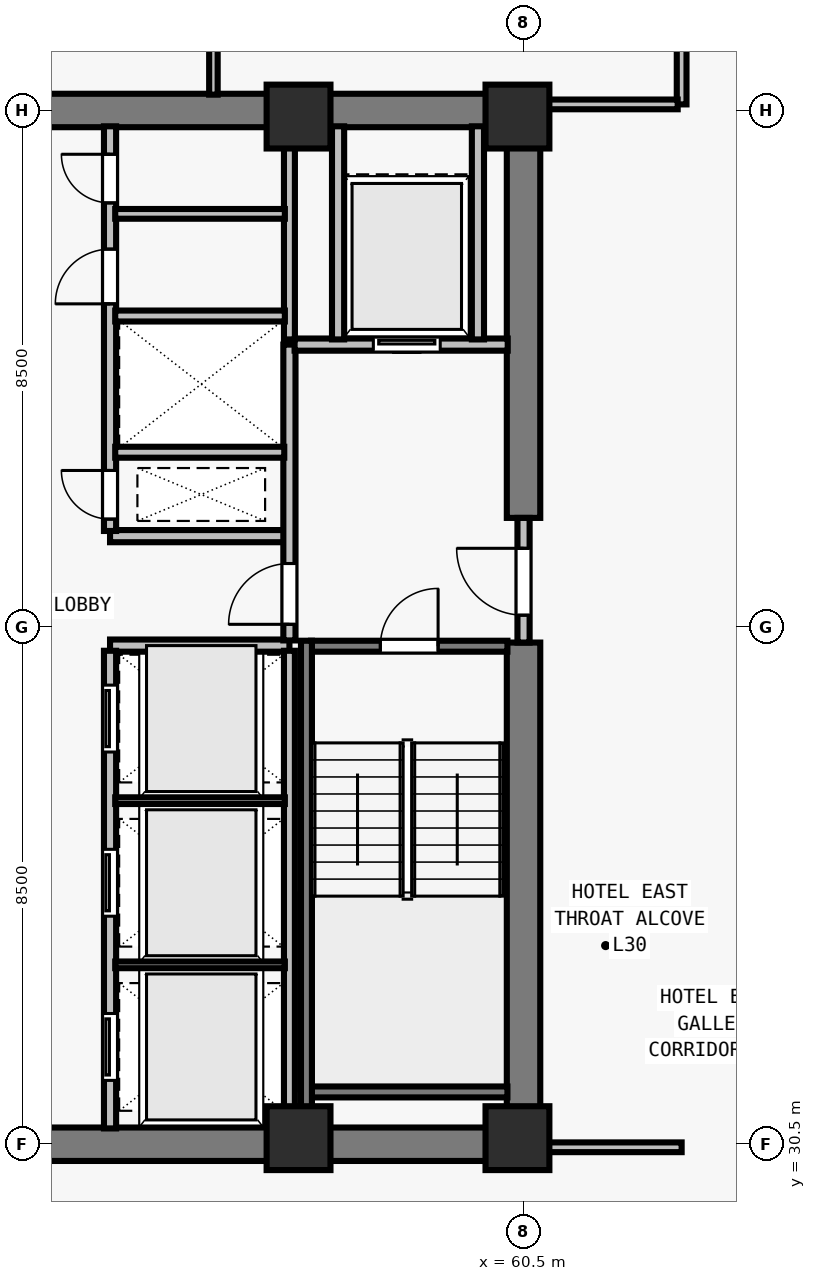
"""IFC4 building model, lengths in metres.
Left out: names, types, materials, properties, quantities, classifications, styles, units other than length and angle.
Written with IfcOpenShell. Run it as: python <this file> out.ifc"""

import sys

from ifc_helpers import new_model, si_unit, direction, frame, frame_2d, origin, origin_2d, place, context, subcontext, project, spatial, rectangle, extrude, element, fill, save


model = new_model("IFC4")
c1 = context("Model", 3, precision=1e-05, world=origin(), true_north=direction((0.0, 1.0)))
c2 = subcontext(c1, "Body", "Model", "MODEL_VIEW")
j1 = project(units=[si_unit("LENGTHUNIT", "METRE"), si_unit("PLANEANGLEUNIT", "RADIAN")], contexts=[c1])
p1 = place(None, origin())
s1 = spatial("IfcSite", under=j1, at=p1, CompositionType="ELEMENT")
p2 = place(p1, origin())
s2 = spatial("IfcBuilding", under=s1, at=p2, CompositionType="ELEMENT")
p3 = place(p2, frame((0.0, 0.0, 113.0)))
s3 = spatial("IfcBuildingStorey", under=s2, at=p3, CompositionType="ELEMENT", Elevation=113.0)
for number, where, z_axis, x_axis in (
    (1, (56.8, 30.6, 0.0), (0.0, 0.0, 1.0), (1.0, 0.0, 0.0)),
    (2, (60.4, 30.6, 0.0), (0.0, 0.0, 1.0), (1.0, 0.0, 0.0)),
    (3, (56.8, 47.4, 0.0), (0.0, 0.0, 1.0), (1.0, 0.0, 0.0)),
    (4, (60.4, 47.4, 0.0), (0.0, 0.0, 1.0), (1.0, 0.0, 0.0)),
):
    element("IfcColumn", number, at=place(p3, frame(where, z_axis=z_axis, x_axis=x_axis)), inside=s3, PredefinedType="COLUMN", context=c2, shape_type="SweptSolid", body=[
        extrude(rectangle(XDim=1.05, YDim=1.05, at=origin_2d()), origin(), (0.0, 0.0, 1.0), 3.5),
    ])
for number, where, z_axis, x_axis in (
    (5, (43.225, 30.5, 0.0), (0.0, 0.0, 1.0), (1.0, 0.0, 0.0)),
    (6, (43.225, 47.5, 0.0), (0.0, 0.0, 1.0), (1.0, 0.0, 0.0)),
):
    element("IfcWall", number, at=place(p3, frame(where, z_axis=z_axis, x_axis=x_axis)), inside=s3, PredefinedType="SHEAR", context=c2, shape_type="SweptSolid", body=[
        extrude(rectangle(XDim=17.55, YDim=0.55, at=frame_2d((8.775, 0.0))), origin(), (0.0, 0.0, 1.0), 3.28),
    ])
p4 = place(p3, frame((60.5, 30.765, 0.0), z_axis=(0.0, 0.0, 1.0), x_axis=(0.0, 1.0, 0.0)))
e7 = element("IfcWall", 7, at=p4, inside=s3, PredefinedType="SHEAR", context=c2, shape_type="SweptSolid", body=[
    extrude(rectangle(XDim=7.985, YDim=0.55, at=frame_2d((3.993, 0.0))), origin(), (0.0, 0.0, 1.0), 3.28),
])
p5 = place(p3, frame((60.5, 40.8, 0.0), z_axis=(0.0, 0.0, 1.0), x_axis=(0.0, 1.0, 0.0)))
e8 = element("IfcWall", 8, at=p5, inside=s3, PredefinedType="SHEAR", context=c2, shape_type="SweptSolid", body=[
    extrude(rectangle(XDim=6.435, YDim=0.55, at=frame_2d((3.218, 0.0))), origin(), (0.0, 0.0, 1.0), 3.28),
])
for number, where, z_axis, x_axis in (
    (9, (53.7, 38.7, 0.0), (0.0, 0.0, 1.0), (1.0, 0.0, 0.0)),
    (10, (53.7, 40.5, 0.0), (0.0, 0.0, 1.0), (1.0, 0.0, 0.0)),
):
    element("IfcWall", number, at=place(p3, frame(where, z_axis=z_axis, x_axis=x_axis)), inside=s3, PredefinedType="SOLIDWALL", context=c2, shape_type="SweptSolid", body=[
        extrude(rectangle(XDim=2.95, YDim=0.2, at=frame_2d((1.475, 0.0))), origin(), (0.0, 0.0, 1.0), 3.28),
    ])
p6 = place(p3, frame((53.7, 30.76, 0.0), z_axis=(0.0, 0.0, 1.0), x_axis=(0.0, 1.0, 0.0)))
e11 = element("IfcWall", 11, at=p6, inside=s3, PredefinedType="SOLIDWALL", context=c2, shape_type="SweptSolid", body=[
    extrude(rectangle(XDim=7.855, YDim=0.2, at=frame_2d((3.927, 0.0))), origin(), (0.0, 0.0, 1.0), 3.28),
])
p7 = place(p6, frame((0.79, 0.0, 0.0)))
e12 = element("IfcOpeningElement", 12, at=p7, cuts=e11, PredefinedType="OPENING", context=c2, shape_type="SweptSolid", body=[
    extrude(rectangle(XDim=1.1, YDim=2.2, at=frame_2d((0.55, 1.1))), frame((0.0, 0.11, 0.0), z_axis=(0.0, -1.0, 0.0), x_axis=(1.0, 0.0, 0.0)), (0.0, 0.0, 1.0), 0.22),
])
p8 = place(p6, frame((3.49, 0.0, 0.0)))
e13 = element("IfcOpeningElement", 13, at=p8, cuts=e11, PredefinedType="OPENING", context=c2, shape_type="SweptSolid", body=[
    extrude(rectangle(XDim=1.1, YDim=2.2, at=frame_2d((0.55, 1.1))), frame((0.0, 0.11, 0.0), z_axis=(0.0, -1.0, 0.0), x_axis=(1.0, 0.0, 0.0)), (0.0, 0.0, 1.0), 0.22),
])
p9 = place(p6, frame((6.19, 0.0, 0.0)))
e14 = element("IfcOpeningElement", 14, at=p9, cuts=e11, PredefinedType="OPENING", context=c2, shape_type="SweptSolid", body=[
    extrude(rectangle(XDim=1.1, YDim=2.2, at=frame_2d((0.55, 1.1))), frame((0.0, 0.11, 0.0), z_axis=(0.0, -1.0, 0.0), x_axis=(1.0, 0.0, 0.0)), (0.0, 0.0, 1.0), 0.22),
])
p10 = place(p3, frame((53.7, 40.585, 0.0), z_axis=(0.0, 0.0, 1.0), x_axis=(0.0, 1.0, 0.0)))
e15 = element("IfcWall", 15, at=p10, inside=s3, PredefinedType="SOLIDWALL", context=c2, shape_type="SweptSolid", body=[
    extrude(rectangle(XDim=6.655, YDim=0.2, at=frame_2d((3.328, 0.0))), origin(), (0.0, 0.0, 1.0), 3.28),
])
p11 = place(p10, frame((0.195, 0.0, 0.0)))
e16 = element("IfcOpeningElement", 16, at=p11, cuts=e15, PredefinedType="OPENING", context=c2, shape_type="SweptSolid", body=[
    extrude(rectangle(XDim=0.8, YDim=2.08, at=frame_2d((0.4, 1.04))), frame((0.0, 0.11, 0.0), z_axis=(0.0, -1.0, 0.0), x_axis=(1.0, 0.0, 0.0)), (0.0, 0.0, 1.0), 0.22),
])
p12 = place(p10, frame((3.735, 0.0, 0.0)))
e17 = element("IfcOpeningElement", 17, at=p12, cuts=e15, PredefinedType="OPENING", context=c2, shape_type="SweptSolid", body=[
    extrude(rectangle(XDim=0.9, YDim=2.12, at=frame_2d((0.45, 1.06))), frame((0.0, 0.11, 0.0), z_axis=(0.0, -1.0, 0.0), x_axis=(1.0, 0.0, 0.0)), (0.0, 0.0, 1.0), 0.22),
])
p13 = place(p10, frame((5.395, 0.0, 0.0)))
e18 = element("IfcOpeningElement", 18, at=p13, cuts=e15, PredefinedType="OPENING", context=c2, shape_type="SweptSolid", body=[
    extrude(rectangle(XDim=0.8, YDim=2.1, at=frame_2d((0.4, 1.05))), frame((0.0, 0.11, 0.0), z_axis=(0.0, -1.0, 0.0), x_axis=(1.0, 0.0, 0.0)), (0.0, 0.0, 1.0), 0.22),
])
p14 = place(p3, frame((60.5, 38.75, 0.0), z_axis=(0.0, 0.0, 1.0), x_axis=(0.0, 1.0, 0.0)))
e19 = element("IfcWall", 19, at=p14, inside=s3, PredefinedType="SOLIDWALL", context=c2, shape_type="SweptSolid", body=[
    extrude(rectangle(XDim=2.05, YDim=0.2, at=frame_2d((1.025, 0.0))), origin(), (0.0, 0.0, 1.0), 3.28),
])
p15 = place(p14, frame((0.45, 0.0, 0.0)))
e20 = element("IfcOpeningElement", 20, at=p15, cuts=e19, PredefinedType="OPENING", context=c2, shape_type="SweptSolid", body=[
    extrude(rectangle(XDim=1.1, YDim=2.15, at=frame_2d((0.55, 1.075))), frame((0.0, 0.11, 0.0), z_axis=(0.0, -1.0, 0.0), x_axis=(1.0, 0.0, 0.0)), (0.0, 0.0, 1.0), 0.22),
])
p16 = place(p3, frame((56.65, 38.785, 0.0), z_axis=(0.0, 0.0, 1.0), x_axis=(0.0, 1.0, 0.0)))
e21 = element("IfcWall", 21, at=p16, inside=s3, PredefinedType="SOLIDWALL", context=c2, shape_type="SweptSolid", body=[
    extrude(rectangle(XDim=4.865, YDim=0.2, at=frame_2d((2.433, 0.0))), origin(), (0.0, 0.0, 1.0), 3.28),
])
p17 = place(p16, frame((0.265, 0.0, 0.0)))
e22 = element("IfcOpeningElement", 22, at=p17, cuts=e21, PredefinedType="OPENING", context=c2, shape_type="SweptSolid", body=[
    extrude(rectangle(XDim=1.0, YDim=2.15, at=frame_2d((0.5, 1.075))), frame((0.0, 0.11, 0.0), z_axis=(0.0, -1.0, 0.0), x_axis=(1.0, 0.0, 0.0)), (0.0, 0.0, 1.0), 0.22),
])
p18 = place(p3, frame((56.735, 43.65, 0.0), z_axis=(0.0, 0.0, 1.0), x_axis=(1.0, 0.0, 0.0)))
e23 = element("IfcWall", 23, at=p18, inside=s3, PredefinedType="SOLIDWALL", context=c2, shape_type="SweptSolid", body=[
    extrude(rectangle(XDim=3.505, YDim=0.2, at=frame_2d((1.752, 0.0))), origin(), (0.0, 0.0, 1.0), 3.28),
])
p19 = place(p18, frame((1.295, 0.0, 0.0)))
e24 = element("IfcOpeningElement", 24, at=p19, cuts=e23, PredefinedType="OPENING", context=c2, shape_type="SweptSolid", body=[
    extrude(rectangle(XDim=1.1, YDim=2.2, at=frame_2d((0.55, 1.1))), frame((0.0, 0.11, 0.0), z_axis=(0.0, -1.0, 0.0), x_axis=(1.0, 0.0, 0.0)), (0.0, 0.0, 1.0), 0.22),
])
for number, where, z_axis, x_axis in (
    (25, (57.45, 43.735, 0.0), (0.0, 0.0, 1.0), (0.0, 1.0, 0.0)),
    (26, (59.75, 43.735, 0.0), (0.0, 0.0, 1.0), (0.0, 1.0, 0.0)),
):
    element("IfcWall", number, at=place(p3, frame(where, z_axis=z_axis, x_axis=x_axis)), inside=s3, PredefinedType="SOLIDWALL", context=c2, shape_type="SweptSolid", body=[
        extrude(rectangle(XDim=3.505, YDim=0.2, at=frame_2d((1.752, 0.0))), origin(), (0.0, 0.0, 1.0), 3.28),
    ])
p20 = place(p3, frame((56.65, 30.76, 0.0), z_axis=(0.0, 0.0, 1.0), x_axis=(0.0, 1.0, 0.0)))
e27 = element("IfcWall", 27, at=p20, inside=s3, PredefinedType="SOLIDWALL", context=c2, shape_type="SweptSolid", body=[
    extrude(rectangle(XDim=7.855, YDim=0.18, at=frame_2d((3.927, 0.0))), origin(), (0.0, 0.0, 1.0), 3.28),
])
for number, where, z_axis, x_axis in (
    (28, (53.785, 33.45, 0.0), (0.0, 0.0, 1.0), (1.0, 0.0, 0.0)),
    (29, (53.785, 36.15, 0.0), (0.0, 0.0, 1.0), (1.0, 0.0, 0.0)),
):
    element("IfcWall", number, at=place(p3, frame(where, z_axis=z_axis, x_axis=x_axis)), inside=s3, PredefinedType="PARTITIONING", context=c2, shape_type="SweptSolid", body=[
        extrude(rectangle(XDim=2.79, YDim=0.11, at=frame_2d((1.395, 0.0))), origin(), (0.0, 0.0, 1.0), 3.28),
    ])
p21 = place(p3, frame((56.65, 43.735, 0.0), z_axis=(0.0, 0.0, 1.0), x_axis=(0.0, 1.0, 0.0)))
e30 = element("IfcWall", 30, at=p21, inside=s3, PredefinedType="SOLIDWALL", context=c2, shape_type="SweptSolid", body=[
    extrude(rectangle(XDim=3.505, YDim=0.18, at=frame_2d((1.752, 0.0))), origin(), (0.0, 0.0, 1.0), 3.28),
])
p22 = place(p3, frame((53.785, 41.88, 0.0), z_axis=(0.0, 0.0, 1.0), x_axis=(1.0, 0.0, 0.0)))
e31 = element("IfcWall", 31, at=p22, inside=s3, PredefinedType="SOLIDWALL", context=c2, shape_type="SweptSolid", body=[
    extrude(rectangle(XDim=2.78, YDim=0.18, at=frame_2d((1.39, 0.0))), origin(), (0.0, 0.0, 1.0), 3.28),
])
p23 = place(p3, frame((53.785, 44.12, 0.0), z_axis=(0.0, 0.0, 1.0), x_axis=(1.0, 0.0, 0.0)))
e32 = element("IfcWall", 32, at=p23, inside=s3, PredefinedType="SOLIDWALL", context=c2, shape_type="SweptSolid", body=[
    extrude(rectangle(XDim=2.79, YDim=0.18, at=frame_2d((1.395, 0.0))), origin(), (0.0, 0.0, 1.0), 3.28),
])
p24 = place(p3, frame((53.785, 45.8, 0.0), z_axis=(0.0, 0.0, 1.0), x_axis=(1.0, 0.0, 0.0)))
e33 = element("IfcWall", 33, at=p24, inside=s3, PredefinedType="PARTITIONING", context=c2, shape_type="SweptSolid", body=[
    extrude(rectangle(XDim=2.79, YDim=0.16, at=frame_2d((1.395, 0.0))), origin(), (0.0, 0.0, 1.0), 3.28),
])
p25 = place(p3, frame((63.1, 47.6, 0.0), z_axis=(0.0, 0.0, 1.0), x_axis=(0.0, 1.0, 0.0)))
e34 = element("IfcWall", 34, at=p25, inside=s3, PredefinedType="PARTITIONING", context=c2, shape_type="SweptSolid", body=[
    extrude(rectangle(XDim=15.075, YDim=0.16, at=frame_2d((7.538, 0.0))), origin(), (0.0, 0.0, 1.0), 2.555),
])
p26 = place(p25, frame((3.5, 0.0, 0.0)))
e35 = element("IfcOpeningElement", 35, at=p26, cuts=e34, PredefinedType="OPENING", context=c2, shape_type="SweptSolid", body=[
    extrude(rectangle(XDim=0.96, YDim=2.12, at=frame_2d((0.48, 1.06))), frame((0.0, 0.09, 0.0), z_axis=(0.0, -1.0, 0.0), x_axis=(1.0, 0.0, 0.0)), (0.0, 0.0, 1.0), 0.18),
])
p27 = place(p3, frame((60.765, 30.45, 0.0), z_axis=(0.0, 0.0, 1.0), x_axis=(1.0, 0.0, 0.0)))
e36 = element("IfcWall", 36, at=p27, inside=s3, PredefinedType="PARTITIONING", context=c2, shape_type="SweptSolid", body=[
    extrude(rectangle(XDim=2.335, YDim=0.16, at=frame_2d((1.167, 0.0))), origin(), (0.0, 0.0, 1.0), 3.28),
])
p28 = place(p3, frame((60.765, 47.6, 0.0), z_axis=(0.0, 0.0, 1.0), x_axis=(1.0, 0.0, 0.0)))
e37 = element("IfcWall", 37, at=p28, inside=s3, PredefinedType="PARTITIONING", context=c2, shape_type="SweptSolid", body=[
    extrude(rectangle(XDim=2.27, YDim=0.16, at=frame_2d((1.135, 0.0))), origin(), (0.0, 0.0, 1.0), 3.28),
])
p29 = place(p3, frame((55.4, 47.76, 0.0), z_axis=(0.0, 0.0, 1.0), x_axis=(0.0, 1.0, 0.0)))
e38 = element("IfcWall", 38, at=p29, inside=s3, PredefinedType="PARTITIONING", context=c2, shape_type="SweptSolid", body=[
    extrude(rectangle(XDim=14.915, YDim=0.14, at=frame_2d((7.458, 0.0))), origin(), (0.0, 0.0, 1.0), 2.896),
])
p30 = place(p3, frame((57.005, 38.69, 0.0), z_axis=(0.0, 0.0, 1.0), x_axis=(1.0, 0.0, 0.0)))
e39 = element("IfcWall", 39, at=p30, inside=s3, PredefinedType="SOLIDWALL", context=c2, shape_type="SweptSolid", body=[
    extrude(rectangle(XDim=3.23, YDim=0.18, at=frame_2d((1.615, 0.0))), origin(), (0.0, 0.0, 1.0), 3.28),
])
p31 = place(p30, frame((1.14, 0.0, 0.0)))
e40 = element("IfcOpeningElement", 40, at=p31, cuts=e39, PredefinedType="OPENING", context=c2, shape_type="SweptSolid", body=[
    extrude(rectangle(XDim=0.95, YDim=2.15, at=frame_2d((0.475, 1.075))), frame((0.0, 0.1, 0.0), z_axis=(0.0, -1.0, 0.0), x_axis=(1.0, 0.0, 0.0)), (0.0, 0.0, 1.0), 0.2),
])
p32 = place(p3, frame((57.005, 31.36, 0.0), z_axis=(0.0, 0.0, 1.0), x_axis=(1.0, 0.0, 0.0)))
e41 = element("IfcWall", 41, at=p32, inside=s3, PredefinedType="SOLIDWALL", context=c2, shape_type="SweptSolid", body=[
    extrude(rectangle(XDim=3.23, YDim=0.18, at=frame_2d((1.615, 0.0))), origin(), (0.0, 0.0, 1.0), 3.28),
])
p33 = place(p3, frame((56.93, 38.78, 0.0), z_axis=(0.0, 0.0, 1.0), x_axis=(0.0, -1.0, 0.0)))
e42 = element("IfcWall", 42, at=p33, inside=s3, PredefinedType="SOLIDWALL", context=c2, shape_type="SweptSolid", body=[
    extrude(rectangle(XDim=8.017, YDim=0.18, at=frame_2d((4.009, 0.0))), origin(), (0.0, 0.0, 1.0), 3.28),
])
p34 = place(p15, origin())
e43 = element("IfcDoor", 43, at=p34, inside=s3, OperationType="SINGLE_SWING_RIGHT", PredefinedType="DOOR", context=c2, shape_type="SweptSolid", body=[
    extrude(rectangle(XDim=1.1, YDim=2.15, at=frame_2d((0.55, 1.075))), frame((0.0, 0.025, 0.0), z_axis=(0.0, -1.0, 0.0), x_axis=(1.0, 0.0, 0.0)), (0.0, 0.0, 1.0), 0.05),
])
fill(e20, e43)
p35 = place(p17, origin())
e44 = element("IfcDoor", 44, at=p35, inside=s3, OperationType="SINGLE_SWING_LEFT", PredefinedType="DOOR", context=c2, shape_type="SweptSolid", body=[
    extrude(rectangle(XDim=1.0, YDim=2.15, at=frame_2d((0.5, 1.075))), frame((0.0, 0.025, 0.0), z_axis=(0.0, -1.0, 0.0), x_axis=(1.0, 0.0, 0.0)), (0.0, 0.0, 1.0), 0.05),
])
fill(e22, e44)
p36 = place(p19, origin())
e45 = element("IfcDoor", 45, at=p36, inside=s3, OperationType="SLIDING_TO_LEFT", PredefinedType="DOOR", context=c2, shape_type="SweptSolid", body=[
    extrude(rectangle(XDim=1.1, YDim=2.2, at=frame_2d((0.55, 1.1))), frame((0.0, 0.025, 0.0), z_axis=(0.0, -1.0, 0.0), x_axis=(1.0, 0.0, 0.0)), (0.0, 0.0, 1.0), 0.05),
])
fill(e24, e45)
p37 = place(p7, origin())
e46 = element("IfcDoor", 46, at=p37, inside=s3, OperationType="SLIDING_TO_LEFT", PredefinedType="DOOR", context=c2, shape_type="SweptSolid", body=[
    extrude(rectangle(XDim=1.1, YDim=2.2, at=frame_2d((0.55, 1.1))), frame((0.0, 0.025, 0.0), z_axis=(0.0, -1.0, 0.0), x_axis=(1.0, 0.0, 0.0)), (0.0, 0.0, 1.0), 0.05),
])
fill(e12, e46)
p38 = place(p8, origin())
e47 = element("IfcDoor", 47, at=p38, inside=s3, OperationType="SLIDING_TO_LEFT", PredefinedType="DOOR", context=c2, shape_type="SweptSolid", body=[
    extrude(rectangle(XDim=1.1, YDim=2.2, at=frame_2d((0.55, 1.1))), frame((0.0, 0.025, 0.0), z_axis=(0.0, -1.0, 0.0), x_axis=(1.0, 0.0, 0.0)), (0.0, 0.0, 1.0), 0.05),
])
fill(e13, e47)
p39 = place(p9, origin())
e48 = element("IfcDoor", 48, at=p39, inside=s3, OperationType="SLIDING_TO_LEFT", PredefinedType="DOOR", context=c2, shape_type="SweptSolid", body=[
    extrude(rectangle(XDim=1.1, YDim=2.2, at=frame_2d((0.55, 1.1))), frame((0.0, 0.025, 0.0), z_axis=(0.0, -1.0, 0.0), x_axis=(1.0, 0.0, 0.0)), (0.0, 0.0, 1.0), 0.05),
])
fill(e14, e48)
p40 = place(p11, origin())
e49 = element("IfcDoor", 49, at=p40, inside=s3, OperationType="SINGLE_SWING_RIGHT", PredefinedType="DOOR", context=c2, shape_type="SweptSolid", body=[
    extrude(rectangle(XDim=0.8, YDim=2.08, at=frame_2d((0.4, 1.04))), frame((0.0, 0.025, 0.0), z_axis=(0.0, -1.0, 0.0), x_axis=(1.0, 0.0, 0.0)), (0.0, 0.0, 1.0), 0.05),
])
fill(e16, e49)
p41 = place(p12, origin())
e50 = element("IfcDoor", 50, at=p41, inside=s3, OperationType="SINGLE_SWING_LEFT", PredefinedType="DOOR", context=c2, shape_type="SweptSolid", body=[
    extrude(rectangle(XDim=0.9, YDim=2.12, at=frame_2d((0.45, 1.06))), frame((0.0, 0.025, 0.0), z_axis=(0.0, -1.0, 0.0), x_axis=(1.0, 0.0, 0.0)), (0.0, 0.0, 1.0), 0.05),
])
fill(e17, e50)
p42 = place(p13, origin())
e51 = element("IfcDoor", 51, at=p42, inside=s3, OperationType="SINGLE_SWING_RIGHT", PredefinedType="DOOR", context=c2, shape_type="SweptSolid", body=[
    extrude(rectangle(XDim=0.8, YDim=2.1, at=frame_2d((0.4, 1.05))), frame((0.0, 0.025, 0.0), z_axis=(0.0, -1.0, 0.0), x_axis=(1.0, 0.0, 0.0)), (0.0, 0.0, 1.0), 0.05),
])
fill(e18, e51)
p43 = place(p31, origin())
e52 = element("IfcDoor", 52, at=p43, inside=s3, OperationType="SINGLE_SWING_RIGHT", PredefinedType="DOOR", context=c2, shape_type="SweptSolid", body=[
    extrude(rectangle(XDim=0.95, YDim=2.15, at=frame_2d((0.475, 1.075))), frame((0.0, 0.025, 0.0), z_axis=(0.0, -1.0, 0.0), x_axis=(1.0, 0.0, 0.0)), (0.0, 0.0, 1.0), 0.05),
])
fill(e40, e52)
save(model, sys.argv[1])
